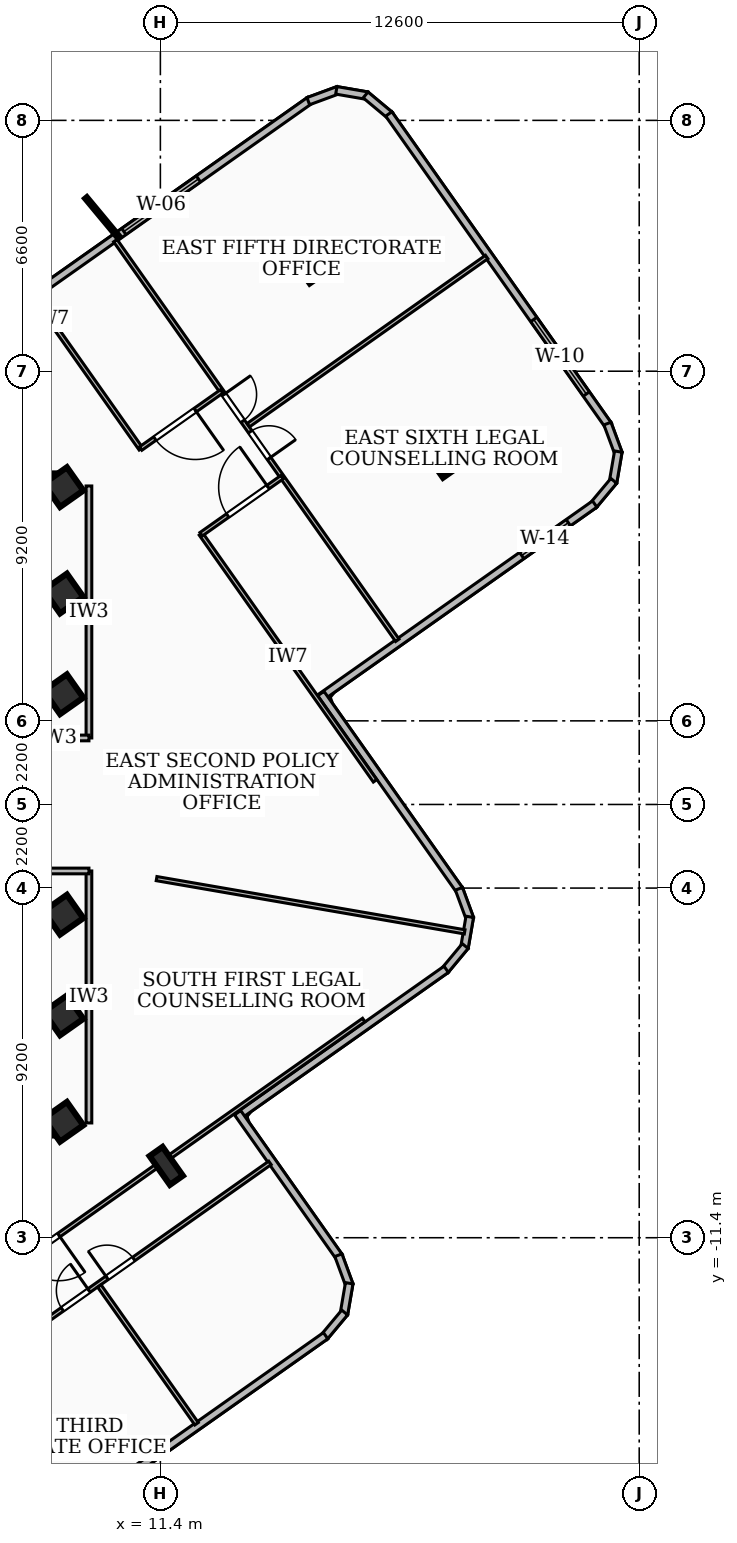
"""IFC4 building model, lengths in metres.
Left out: names, types, materials, properties, quantities, classifications, styles, units other than length and angle.
Written with IfcOpenShell. Run it as: python <this file> out.ifc"""

import sys

from ifc_helpers import new_model, si_unit, direction, frame, frame_2d, origin, origin_2d, place, context, subcontext, project, spatial, rectangle, i_section, extrude, element, fill, save


model = new_model("IFC4")
c1 = context("Model", 3, precision=1e-05, world=origin(), true_north=direction((0.0, 1.0)))
c2 = subcontext(c1, "Body", "Model", "MODEL_VIEW")
j1 = project(units=[si_unit("LENGTHUNIT", "METRE"), si_unit("PLANEANGLEUNIT", "RADIAN")], contexts=[c1])
p1 = place(None, origin())
s1 = spatial("IfcSite", under=j1, at=p1, CompositionType="ELEMENT")
p2 = place(p1, origin())
s2 = spatial("IfcBuilding", under=s1, at=p2, CompositionType="ELEMENT")
p3 = place(p2, frame((0.0, 0.0, 222.3)))
s3 = spatial("IfcBuildingStorey", under=s2, at=p3, CompositionType="ELEMENT", Elevation=222.3)
for number, where, z_axis, x_axis in (
    (1, (-8.78, 8.51, 0.0), (0.0, 0.0, 1.0), (1.0, 0.0, 0.0)),
    (2, (8.78, -8.51, 0.0), (0.0, 0.0, 1.0), (-1.0, 0.0, 0.0)),
):
    element("IfcWall", number, at=place(p3, frame(where, z_axis=z_axis, x_axis=x_axis)), inside=s3, PredefinedType="SHEAR", context=c2, shape_type="SweptSolid", body=[
        extrude(rectangle(XDim=17.56, YDim=0.4, at=frame_2d((8.78, 0.0))), origin(), (0.0, 0.0, 1.0), 3.14),
    ])
for number, where, z_axis, x_axis in (
    (3, (8.85, -5.55, 0.0), (0.0, 0.0, 1.0), (0.817, 0.576, 0.0)),
    (4, (8.85, -2.9, 0.0), (0.0, 0.0, 1.0), (0.817, 0.576, 0.0)),
    (5, (8.85, 2.9, 0.0), (0.0, 0.0, 1.0), (0.817, 0.576, 0.0)),
    (6, (8.85, 5.55, 0.0), (0.0, 0.0, 1.0), (0.817, 0.576, 0.0)),
    (7, (8.85, -8.35, 0.0), (0.0, 0.0, 1.0), (0.817, 0.576, 0.0)),
    (8, (8.85, 8.35, 0.0), (0.0, 0.0, 1.0), (0.817, 0.576, 0.0)),
):
    element("IfcColumn", number, at=place(p3, frame(where, z_axis=z_axis, x_axis=x_axis)), inside=s3, PredefinedType="COLUMN", context=c2, shape_type="SweptSolid", body=[
        extrude(rectangle(XDim=0.75, YDim=0.75, at=origin_2d()), origin(), (0.0, 0.0, 1.0), 3.42),
    ])
for number, where, z_axis, x_axis in (
    (9, (18.741, 9.097, 0.0), (0.0, 0.0, 1.0), (0.817, 0.576, 0.0)),
    (10, (15.234, 14.209, 0.0), (0.0, 0.0, 1.0), (0.817, 0.576, 0.0)),
    (11, (11.554, -9.51, 0.0), (0.0, 0.0, 1.0), (0.817, 0.576, 0.0)),
):
    element("IfcColumn", number, at=place(p3, frame(where, z_axis=z_axis, x_axis=x_axis)), inside=s3, PredefinedType="COLUMN", context=c2, shape_type="SweptSolid", body=[
        extrude(i_section(OverallWidth=0.418, OverallDepth=0.927, WebThickness=0.019, FlangeThickness=0.032, at=origin_2d()), origin(), (0.0, 0.0, 1.0), 3.42),
    ])
p4 = place(p3, frame((8.111, 13.432, 0.0), z_axis=(0.0, 0.0, 1.0), x_axis=(0.81712855258, 0.576455487058, 0.0)))
e12 = element("IfcWall", 12, at=p4, inside=s3, PredefinedType="SOLIDWALL", context=c2, shape_type="SweptSolid", body=[
    extrude(rectangle(XDim=8.841, YDim=0.2, at=frame_2d((4.42, 0.0))), origin(), (0.0, 0.0, 1.0), 3.14),
])
p5 = place(p4, frame((2.85, 0.0, 0.85)))
e13 = element("IfcOpeningElement", 13, at=p5, cuts=e12, PredefinedType="OPENING", context=c2, shape_type="SweptSolid", body=[
    extrude(rectangle(XDim=2.4, YDim=1.85, at=frame_2d((1.2, 0.925))), frame((0.0, 0.11, 0.0), z_axis=(0.0, -1.0, 0.0), x_axis=(1.0, 0.0, 0.0)), (0.0, 0.0, 1.0), 0.22),
])
p6 = place(p3, frame((15.292, 18.505, 0.0), z_axis=(0.0, 0.0, 1.0), x_axis=(0.938148911857, 0.346232030844, 0.0)))
e14 = element("IfcWall", 14, at=p6, inside=s3, PredefinedType="SOLIDWALL", context=c2, shape_type="SweptSolid", body=[
    extrude(rectangle(XDim=0.838, YDim=0.2, at=frame_2d((0.419, 0.0))), origin(), (0.0, 0.0, 1.0), 3.14),
])
p7 = place(p3, frame((16.03, 18.79, 0.0), z_axis=(0.0, 0.0, 1.0), x_axis=(0.985501046628, -0.16966934636, 0.0)))
e15 = element("IfcWall", 15, at=p7, inside=s3, PredefinedType="SOLIDWALL", context=c2, shape_type="SweptSolid", body=[
    extrude(rectangle(XDim=0.826, YDim=0.2, at=frame_2d((0.413, 0.0))), origin(), (0.0, 0.0, 1.0), 3.14),
])
p8 = place(p3, frame((16.8, 18.67, 0.0), z_axis=(0.0, 0.0, 1.0), x_axis=(0.767647650908, -0.640872127694, 0.0)))
e16 = element("IfcWall", 16, at=p8, inside=s3, PredefinedType="SOLIDWALL", context=c2, shape_type="SweptSolid", body=[
    extrude(rectangle(XDim=0.838, YDim=0.2, at=frame_2d((0.419, 0.0))), origin(), (0.0, 0.0, 1.0), 3.14),
])
p9 = place(p3, frame((17.41, 18.169, 0.0), z_axis=(0.0, 0.0, 1.0), x_axis=(0.576414426355, -0.817157517918, 0.0)))
e17 = element("IfcWall", 17, at=p9, inside=s3, PredefinedType="SOLIDWALL", context=c2, shape_type="SweptSolid", body=[
    extrude(rectangle(XDim=10.022, YDim=0.2, at=frame_2d((5.011, 0.0))), origin(), (0.0, 0.0, 1.0), 3.14),
])
p10 = place(p9, frame((6.618, 0.0, 0.85)))
e18 = element("IfcOpeningElement", 18, at=p10, cuts=e17, PredefinedType="OPENING", context=c2, shape_type="SweptSolid", body=[
    extrude(rectangle(XDim=2.4, YDim=1.65, at=frame_2d((1.2, 0.825))), frame((0.0, 0.11, 0.0), z_axis=(0.0, -1.0, 0.0), x_axis=(1.0, 0.0, 0.0)), (0.0, 0.0, 1.0), 0.22),
])
p11 = place(p3, frame((23.164, 10.022, 0.0), z_axis=(0.0, 0.0, 1.0), x_axis=(0.347637287427, -0.937629093187, 0.0)))
e19 = element("IfcWall", 19, at=p11, inside=s3, PredefinedType="SOLIDWALL", context=c2, shape_type="SweptSolid", body=[
    extrude(rectangle(XDim=0.837, YDim=0.2, at=frame_2d((0.418, 0.0))), origin(), (0.0, 0.0, 1.0), 3.14),
])
p12 = place(p3, frame((23.45, 9.285, 0.0), z_axis=(0.0, 0.0, 1.0), x_axis=(-0.169382242965, -0.985550432889, 0.0)))
e20 = element("IfcWall", 20, at=p12, inside=s3, PredefinedType="SOLIDWALL", context=c2, shape_type="SweptSolid", body=[
    extrude(rectangle(XDim=0.826, YDim=0.2, at=frame_2d((0.413, 0.0))), origin(), (0.0, 0.0, 1.0), 3.14),
])
p13 = place(p3, frame((23.33, 8.515, 0.0), z_axis=(0.0, 0.0, 1.0), x_axis=(-0.641187201728, -0.767384500977, 0.0)))
e21 = element("IfcWall", 21, at=p13, inside=s3, PredefinedType="SOLIDWALL", context=c2, shape_type="SweptSolid", body=[
    extrude(rectangle(XDim=0.838, YDim=0.2, at=frame_2d((0.419, 0.0))), origin(), (0.0, 0.0, 1.0), 3.14),
])
p14 = place(p3, frame((22.829, 7.905, 0.0), z_axis=(0.0, 0.0, 1.0), x_axis=(-0.817135410946, -0.576445765166, 0.0)))
e22 = element("IfcWall", 22, at=p14, inside=s3, PredefinedType="SOLIDWALL", context=c2, shape_type="SweptSolid", body=[
    extrude(rectangle(XDim=8.842, YDim=0.2, at=frame_2d((4.421, 0.0))), origin(), (0.0, 0.0, 1.0), 3.14),
])
p15 = place(p14, frame((0.85, 0.0, 0.85)))
e23 = element("IfcOpeningElement", 23, at=p15, cuts=e22, PredefinedType="OPENING", context=c2, shape_type="SweptSolid", body=[
    extrude(rectangle(XDim=1.5, YDim=1.5, at=frame_2d((0.75, 0.75))), frame((0.0, 0.11, 0.0), z_axis=(0.0, -1.0, 0.0), x_axis=(1.0, 0.0, 0.0)), (0.0, 0.0, 1.0), 0.22),
])
p16 = place(p3, frame((15.623, 2.919, 0.0), z_axis=(0.0, 0.0, 1.0), x_axis=(0.576566796686, -0.817050016192, 0.0)))
e24 = element("IfcWall", 24, at=p16, inside=s3, PredefinedType="SOLIDWALL", context=c2, shape_type="SweptSolid", body=[
    extrude(rectangle(XDim=6.341, YDim=0.2, at=frame_2d((3.17, 0.0))), origin(), (0.0, 0.0, 1.0), 3.14),
])
p17 = place(p3, frame((19.256, -2.219, 0.0), z_axis=(0.0, 0.0, 1.0), x_axis=(0.345975487894, -0.938243551417, 0.0)))
e25 = element("IfcWall", 25, at=p17, inside=s3, PredefinedType="SOLIDWALL", context=c2, shape_type="SweptSolid", body=[
    extrude(rectangle(XDim=0.838, YDim=0.2, at=frame_2d((0.419, 0.0))), origin(), (0.0, 0.0, 1.0), 3.14),
])
p18 = place(p3, frame((19.541, -2.957, 0.0), z_axis=(0.0, 0.0, 1.0), x_axis=(-0.169867275979, -0.985466949497, 0.0)))
e26 = element("IfcWall", 26, at=p18, inside=s3, PredefinedType="SOLIDWALL", context=c2, shape_type="SweptSolid", body=[
    extrude(rectangle(XDim=0.825, YDim=0.2, at=frame_2d((0.413, 0.0))), origin(), (0.0, 0.0, 1.0), 3.14),
])
p19 = place(p3, frame((19.421, -3.726, 0.0), z_axis=(0.0, 0.0, 1.0), x_axis=(-0.639610986305, -0.768698761673, 0.0)))
e27 = element("IfcWall", 27, at=p19, inside=s3, PredefinedType="SOLIDWALL", context=c2, shape_type="SweptSolid", body=[
    extrude(rectangle(XDim=0.838, YDim=0.2, at=frame_2d((0.419, 0.0))), origin(), (0.0, 0.0, 1.0), 3.14),
])
p20 = place(p3, frame((18.921, -4.337, 0.0), z_axis=(0.0, 0.0, 1.0), x_axis=(-0.817167578816, -0.576400163196, 0.0)))
e28 = element("IfcWall", 28, at=p20, inside=s3, PredefinedType="SOLIDWALL", context=c2, shape_type="SweptSolid", body=[
    extrude(rectangle(XDim=6.74, YDim=0.2, at=frame_2d((3.37, 0.0))), origin(), (0.0, 0.0, 1.0), 3.14),
])
p21 = place(p3, frame((13.432, -8.111, 0.0), z_axis=(0.0, 0.0, 1.0), x_axis=(0.576445639344, -0.817135499707, 0.0)))
e29 = element("IfcWall", 29, at=p21, inside=s3, PredefinedType="SOLIDWALL", context=c2, shape_type="SweptSolid", body=[
    extrude(rectangle(XDim=4.641, YDim=0.2, at=frame_2d((2.32, 0.0))), origin(), (0.0, 0.0, 1.0), 3.14),
])
p22 = place(p3, frame((16.084, -11.86, 0.0), z_axis=(0.0, 0.0, 1.0), x_axis=(0.346232030844, -0.938148911857, 0.0)))
e30 = element("IfcWall", 30, at=p22, inside=s3, PredefinedType="SOLIDWALL", context=c2, shape_type="SweptSolid", body=[
    extrude(rectangle(XDim=0.838, YDim=0.2, at=frame_2d((0.419, 0.0))), origin(), (0.0, 0.0, 1.0), 3.14),
])
p23 = place(p3, frame((16.369, -12.598, 0.0), z_axis=(0.0, 0.0, 1.0), x_axis=(-0.169332910212, -0.985558910223, 0.0)))
e31 = element("IfcWall", 31, at=p23, inside=s3, PredefinedType="SOLIDWALL", context=c2, shape_type="SweptSolid", body=[
    extrude(rectangle(XDim=0.826, YDim=0.2, at=frame_2d((0.413, 0.0))), origin(), (0.0, 0.0, 1.0), 3.14),
])
p24 = place(p3, frame((16.249, -13.368, 0.0), z_axis=(0.0, 0.0, 1.0), x_axis=(-0.641043819012, -0.76750428149, 0.0)))
e32 = element("IfcWall", 32, at=p24, inside=s3, PredefinedType="SOLIDWALL", context=c2, shape_type="SweptSolid", body=[
    extrude(rectangle(XDim=0.838, YDim=0.2, at=frame_2d((0.419, 0.0))), origin(), (0.0, 0.0, 1.0), 3.14),
])
p25 = place(p3, frame((15.748, -13.978, 0.0), z_axis=(0.0, 0.0, 1.0), x_axis=(-0.817168991675, -0.576398160168, 0.0)))
e33 = element("IfcWall", 33, at=p25, inside=s3, PredefinedType="SOLIDWALL", context=c2, shape_type="SweptSolid", body=[
    extrude(rectangle(XDim=10.022, YDim=0.2, at=frame_2d((5.011, 0.0))), origin(), (0.0, 0.0, 1.0), 3.14),
])
p26 = place(p25, frame((7.068, 0.0, 0.85)))
e34 = element("IfcOpeningElement", 34, at=p26, cuts=e33, PredefinedType="OPENING", context=c2, shape_type="SweptSolid", body=[
    extrude(rectangle(XDim=1.5, YDim=1.5, at=frame_2d((0.75, 0.75))), frame((0.0, 0.11, 0.0), z_axis=(0.0, -1.0, 0.0), x_axis=(1.0, 0.0, 0.0)), (0.0, 0.0, 1.0), 0.22),
])
p27 = place(p3, frame((9.52, 1.75, 0.0), z_axis=(0.0, 0.0, 1.0), x_axis=(0.0, 1.0, 0.0)))
e35 = element("IfcWall", 35, at=p27, inside=s3, PredefinedType="PARTITIONING", context=c2, shape_type="SweptSolid", body=[
    extrude(rectangle(XDim=6.63, YDim=0.15, at=frame_2d((3.315, 0.0))), origin(), (0.0, 0.0, 1.0), 2.51),
])
p28 = place(p3, frame((7.85, 1.75, 0.0), z_axis=(0.0, 0.0, 1.0), x_axis=(1.0, 0.0, 0.0)))
e36 = element("IfcWall", 36, at=p28, inside=s3, PredefinedType="PARTITIONING", context=c2, shape_type="SweptSolid", body=[
    extrude(rectangle(XDim=1.67, YDim=0.15, at=frame_2d((0.835, 0.0))), origin(), (0.0, 0.0, 1.0), 2.37),
])
p29 = place(p3, frame((9.52, -8.38, 0.0), z_axis=(0.0, 0.0, 1.0), x_axis=(0.0, 1.0, 0.0)))
e37 = element("IfcWall", 37, at=p29, inside=s3, PredefinedType="PARTITIONING", context=c2, shape_type="SweptSolid", body=[
    extrude(rectangle(XDim=6.63, YDim=0.15, at=frame_2d((3.315, 0.0))), origin(), (0.0, 0.0, 1.0), 3.14),
])
p30 = place(p3, frame((7.85, -1.75, 0.0), z_axis=(0.0, 0.0, 1.0), x_axis=(1.0, 0.0, 0.0)))
e38 = element("IfcWall", 38, at=p30, inside=s3, PredefinedType="PARTITIONING", context=c2, shape_type="SweptSolid", body=[
    extrude(rectangle(XDim=1.67, YDim=0.15, at=frame_2d((0.835, 0.0))), origin(), (0.0, 0.0, 1.0), 2.37),
])
p31 = place(p3, frame((11.3, -1.951, 0.0), z_axis=(0.0, 0.0, 1.0), x_axis=(0.985391330126, -0.170305391905, 0.0)))
e39 = element("IfcWall", 39, at=p31, inside=s3, PredefinedType="PARTITIONING", context=c2, shape_type="SweptSolid", body=[
    extrude(rectangle(XDim=8.227, YDim=0.11, at=frame_2d((4.114, 0.0))), origin(), (0.0, 0.0, 1.0), 3.14),
])
p32 = place(p3, frame((10.887, 9.357, 0.0), z_axis=(0.0, 0.0, 1.0), x_axis=(-0.576423728743, 0.817150956031, 0.0)))
e40 = element("IfcWall", 40, at=p32, inside=s3, PredefinedType="PARTITIONING", context=c2, shape_type="SweptSolid", body=[
    extrude(rectangle(XDim=8.35, YDim=0.11, at=frame_2d((4.175, 0.0))), origin(), (0.0, 0.0, 1.0), 2.51),
])
p33 = place(p3, frame((17.049, 0.621, 0.0), z_axis=(0.0, 0.0, 1.0), x_axis=(-0.57635038395, 0.817202689007, 0.0)))
e41 = element("IfcWall", 41, at=p33, inside=s3, PredefinedType="PARTITIONING", context=c2, shape_type="SweptSolid", body=[
    extrude(rectangle(XDim=7.95, YDim=0.11, at=frame_2d((3.975, 0.0))), origin(), (0.0, 0.0, 1.0), 3.14),
])
p34 = place(p3, frame((13.014, 10.869, 0.0), z_axis=(0.0, 0.0, 1.0), x_axis=(-0.817133808286, -0.576448036995, 0.0)))
e42 = element("IfcWall", 42, at=p34, inside=s3, PredefinedType="PARTITIONING", context=c2, shape_type="SweptSolid", body=[
    extrude(rectangle(XDim=2.609, YDim=0.11, at=frame_2d((1.304, 0.0))), origin(), (0.0, 0.0, 1.0), 3.14),
])
p35 = place(p34, frame((0.854, 0.0, 0.0)))
e43 = element("IfcOpeningElement", 43, at=p35, cuts=e42, PredefinedType="OPENING", context=c2, shape_type="SweptSolid", body=[
    extrude(rectangle(XDim=1.3, YDim=2.1, at=frame_2d((0.65, 1.05))), frame((0.0, 0.065, 0.0), z_axis=(0.0, -1.0, 0.0), x_axis=(1.0, 0.0, 0.0)), (0.0, 0.0, 1.0), 0.13),
])
p36 = place(p3, frame((12.472, 7.11, 0.0), z_axis=(0.0, 0.0, 1.0), x_axis=(0.81728919746, 0.576227704745, 0.0)))
e44 = element("IfcWall", 44, at=p36, inside=s3, PredefinedType="PARTITIONING", context=c2, shape_type="SweptSolid", body=[
    extrude(rectangle(XDim=2.61, YDim=0.11, at=frame_2d((1.305, 0.0))), origin(), (0.0, 0.0, 1.0), 3.14),
])
p37 = place(p36, frame((0.855, 0.0, 0.0)))
e45 = element("IfcOpeningElement", 45, at=p37, cuts=e44, PredefinedType="OPENING", context=c2, shape_type="SweptSolid", body=[
    extrude(rectangle(XDim=1.3, YDim=2.1, at=frame_2d((0.65, 1.05))), frame((0.0, 0.065, 0.0), z_axis=(0.0, -1.0, 0.0), x_axis=(1.0, 0.0, 0.0)), (0.0, 0.0, 1.0), 0.13),
])
p38 = place(p3, frame((13.715, 9.981, 0.0), z_axis=(0.0, 0.0, 1.0), x_axis=(0.817122118381, 0.576464607459, 0.0)))
e46 = element("IfcWall", 46, at=p38, inside=s3, PredefinedType="PARTITIONING", context=c2, shape_type="SweptSolid", body=[
    extrude(rectangle(XDim=7.675, YDim=0.11, at=frame_2d((3.837, 0.0))), origin(), (0.0, 0.0, 1.0), 3.14),
])
p39 = place(p3, frame((10.215, 14.836, 0.0), z_axis=(0.0, 0.0, 1.0), x_axis=(0.576525296339, -0.817079300118, 0.0)))
e47 = element("IfcWall", 47, at=p39, inside=s3, PredefinedType="PARTITIONING", context=c2, shape_type="SweptSolid", body=[
    extrude(rectangle(XDim=12.87, YDim=0.11, at=frame_2d((6.435, 0.0))), origin(), (0.0, 0.0, 1.0), 2.51),
])
p40 = place(p39, frame((6.155, 0.0, 0.0)))
e48 = element("IfcOpeningElement", 48, at=p40, cuts=e47, PredefinedType="OPENING", context=c2, shape_type="SweptSolid", body=[
    extrude(rectangle(XDim=0.86, YDim=2.04, at=frame_2d((0.43, 1.02))), frame((0.0, 0.065, 0.0), z_axis=(0.0, -1.0, 0.0), x_axis=(1.0, 0.0, 0.0)), (0.0, 0.0, 1.0), 0.13),
])
p41 = place(p39, frame((4.955, 0.0, 0.0)))
e49 = element("IfcOpeningElement", 49, at=p41, cuts=e47, PredefinedType="OPENING", context=c2, shape_type="SweptSolid", body=[
    extrude(rectangle(XDim=0.86, YDim=2.04, at=frame_2d((0.43, 1.02))), frame((0.0, 0.065, 0.0), z_axis=(0.0, -1.0, 0.0), x_axis=(1.0, 0.0, 0.0)), (0.0, 0.0, 1.0), 0.13),
])
p42 = place(p3, frame((16.752, -5.671, 0.0), z_axis=(0.0, 0.0, 1.0), x_axis=(-0.81715881447, -0.576412588285, 0.0)))
e50 = element("IfcWall", 50, at=p42, inside=s3, PredefinedType="PARTITIONING", context=c2, shape_type="SweptSolid", body=[
    extrude(rectangle(XDim=20.44, YDim=0.11, at=frame_2d((10.22, 0.0))), origin(), (0.0, 0.0, 1.0), 2.51),
])
p43 = place(p42, frame((9.82, 0.0, 0.0)))
e51 = element("IfcOpeningElement", 51, at=p43, cuts=e50, PredefinedType="OPENING", context=c2, shape_type="SweptSolid", body=[
    extrude(rectangle(XDim=1.2, YDim=2.1, at=frame_2d((0.6, 1.05))), frame((0.0, 0.065, 0.0), z_axis=(0.0, -1.0, 0.0), x_axis=(1.0, 0.0, 0.0)), (0.0, 0.0, 1.0), 0.13),
])
p44 = place(p3, frame((9.795, -12.671, 0.0), z_axis=(0.0, 0.0, 1.0), x_axis=(0.576531911777, -0.817074632272, 0.0)))
e52 = element("IfcWall", 52, at=p44, inside=s3, PredefinedType="PARTITIONING", context=c2, shape_type="SweptSolid", body=[
    extrude(rectangle(XDim=4.435, YDim=0.11, at=frame_2d((2.218, 0.0))), origin(), (0.0, 0.0, 1.0), 3.14),
])
p45 = place(p3, frame((3.766, -16.85, 0.0), z_axis=(0.0, 0.0, 1.0), x_axis=(0.817131323803, 0.576451558815, 0.0)))
e53 = element("IfcWall", 53, at=p45, inside=s3, PredefinedType="PARTITIONING", context=c2, shape_type="SweptSolid", body=[
    extrude(rectangle(XDim=12.87, YDim=0.11, at=frame_2d((6.435, 0.0))), origin(), (0.0, 0.0, 1.0), 2.51),
])
p46 = place(p45, frame((6.185, 0.0, 0.0)))
e54 = element("IfcOpeningElement", 54, at=p46, cuts=e53, PredefinedType="OPENING", context=c2, shape_type="SweptSolid", body=[
    extrude(rectangle(XDim=0.86, YDim=2.04, at=frame_2d((0.43, 1.02))), frame((0.0, 0.065, 0.0), z_axis=(0.0, -1.0, 0.0), x_axis=(1.0, 0.0, 0.0)), (0.0, 0.0, 1.0), 0.13),
])
p47 = place(p45, frame((7.625, 0.0, 0.0)))
e55 = element("IfcOpeningElement", 55, at=p47, cuts=e53, PredefinedType="OPENING", context=c2, shape_type="SweptSolid", body=[
    extrude(rectangle(XDim=0.86, YDim=2.04, at=frame_2d((0.43, 1.02))), frame((0.0, 0.065, 0.0), z_axis=(0.0, -1.0, 0.0), x_axis=(1.0, 0.0, 0.0)), (0.0, 0.0, 1.0), 0.13),
])
p48 = place(p5, origin())
e56 = element("IfcWindow", 56, at=p48, inside=s3, PartitioningType="SINGLE_PANEL", PredefinedType="WINDOW", context=c2, shape_type="SweptSolid", body=[
    extrude(rectangle(XDim=2.4, YDim=1.85, at=frame_2d((1.2, 0.925))), frame((0.0, 0.03, 0.0), z_axis=(0.0, -1.0, 0.0), x_axis=(1.0, 0.0, 0.0)), (0.0, 0.0, 1.0), 0.06),
])
fill(e13, e56)
p49 = place(p10, origin())
e57 = element("IfcWindow", 57, at=p49, inside=s3, PartitioningType="SINGLE_PANEL", PredefinedType="WINDOW", context=c2, shape_type="SweptSolid", body=[
    extrude(rectangle(XDim=2.4, YDim=1.65, at=frame_2d((1.2, 0.825))), frame((0.0, 0.03, 0.0), z_axis=(0.0, -1.0, 0.0), x_axis=(1.0, 0.0, 0.0)), (0.0, 0.0, 1.0), 0.06),
])
fill(e18, e57)
p50 = place(p15, origin())
e58 = element("IfcWindow", 58, at=p50, inside=s3, PartitioningType="SINGLE_PANEL", PredefinedType="WINDOW", context=c2, shape_type="SweptSolid", body=[
    extrude(rectangle(XDim=1.5, YDim=1.5, at=frame_2d((0.75, 0.75))), frame((0.0, 0.03, 0.0), z_axis=(0.0, -1.0, 0.0), x_axis=(1.0, 0.0, 0.0)), (0.0, 0.0, 1.0), 0.06),
])
fill(e23, e58)
p51 = place(p35, origin())
e59 = element("IfcDoor", 59, at=p51, inside=s3, OperationType="SINGLE_SWING_LEFT", PredefinedType="DOOR", context=c2, shape_type="SweptSolid", body=[
    extrude(rectangle(XDim=1.3, YDim=2.1, at=frame_2d((0.65, 1.05))), frame((0.0, 0.025, 0.0), z_axis=(0.0, -1.0, 0.0), x_axis=(1.0, 0.0, 0.0)), (0.0, 0.0, 1.0), 0.05),
])
fill(e43, e59)
p52 = place(p37, origin())
e60 = element("IfcDoor", 60, at=p52, inside=s3, OperationType="SINGLE_SWING_RIGHT", PredefinedType="DOOR", context=c2, shape_type="SweptSolid", body=[
    extrude(rectangle(XDim=1.3, YDim=2.1, at=frame_2d((0.65, 1.05))), frame((0.0, 0.025, 0.0), z_axis=(0.0, -1.0, 0.0), x_axis=(1.0, 0.0, 0.0)), (0.0, 0.0, 1.0), 0.05),
])
fill(e45, e60)
p53 = place(p40, origin())
e61 = element("IfcDoor", 61, at=p53, inside=s3, OperationType="SINGLE_SWING_RIGHT", PredefinedType="DOOR", context=c2, shape_type="SweptSolid", body=[
    extrude(rectangle(XDim=0.86, YDim=2.04, at=frame_2d((0.43, 1.02))), frame((0.0, 0.025, 0.0), z_axis=(0.0, -1.0, 0.0), x_axis=(1.0, 0.0, 0.0)), (0.0, 0.0, 1.0), 0.05),
])
fill(e48, e61)
p54 = place(p41, origin())
e62 = element("IfcDoor", 62, at=p54, inside=s3, OperationType="SINGLE_SWING_LEFT", PredefinedType="DOOR", context=c2, shape_type="SweptSolid", body=[
    extrude(rectangle(XDim=0.86, YDim=2.04, at=frame_2d((0.43, 1.02))), frame((0.0, 0.025, 0.0), z_axis=(0.0, -1.0, 0.0), x_axis=(1.0, 0.0, 0.0)), (0.0, 0.0, 1.0), 0.05),
])
fill(e49, e62)
p55 = place(p43, origin())
e63 = element("IfcDoor", 63, at=p55, inside=s3, OperationType="SINGLE_SWING_LEFT", PredefinedType="DOOR", context=c2, shape_type="SweptSolid", body=[
    extrude(rectangle(XDim=1.2, YDim=2.1, at=frame_2d((0.6, 1.05))), frame((0.0, 0.025, 0.0), z_axis=(0.0, -1.0, 0.0), x_axis=(1.0, 0.0, 0.0)), (0.0, 0.0, 1.0), 0.05),
])
fill(e51, e63)
p56 = place(p46, origin())
e64 = element("IfcDoor", 64, at=p56, inside=s3, OperationType="SINGLE_SWING_RIGHT", PredefinedType="DOOR", context=c2, shape_type="SweptSolid", body=[
    extrude(rectangle(XDim=0.86, YDim=2.04, at=frame_2d((0.43, 1.02))), frame((0.0, 0.025, 0.0), z_axis=(0.0, -1.0, 0.0), x_axis=(1.0, 0.0, 0.0)), (0.0, 0.0, 1.0), 0.05),
])
fill(e54, e64)
p57 = place(p47, origin())
e65 = element("IfcDoor", 65, at=p57, inside=s3, OperationType="SINGLE_SWING_LEFT", PredefinedType="DOOR", context=c2, shape_type="SweptSolid", body=[
    extrude(rectangle(XDim=0.86, YDim=2.04, at=frame_2d((0.43, 1.02))), frame((0.0, 0.025, 0.0), z_axis=(0.0, -1.0, 0.0), x_axis=(1.0, 0.0, 0.0)), (0.0, 0.0, 1.0), 0.05),
])
fill(e55, e65)
save(model, sys.argv[1])
